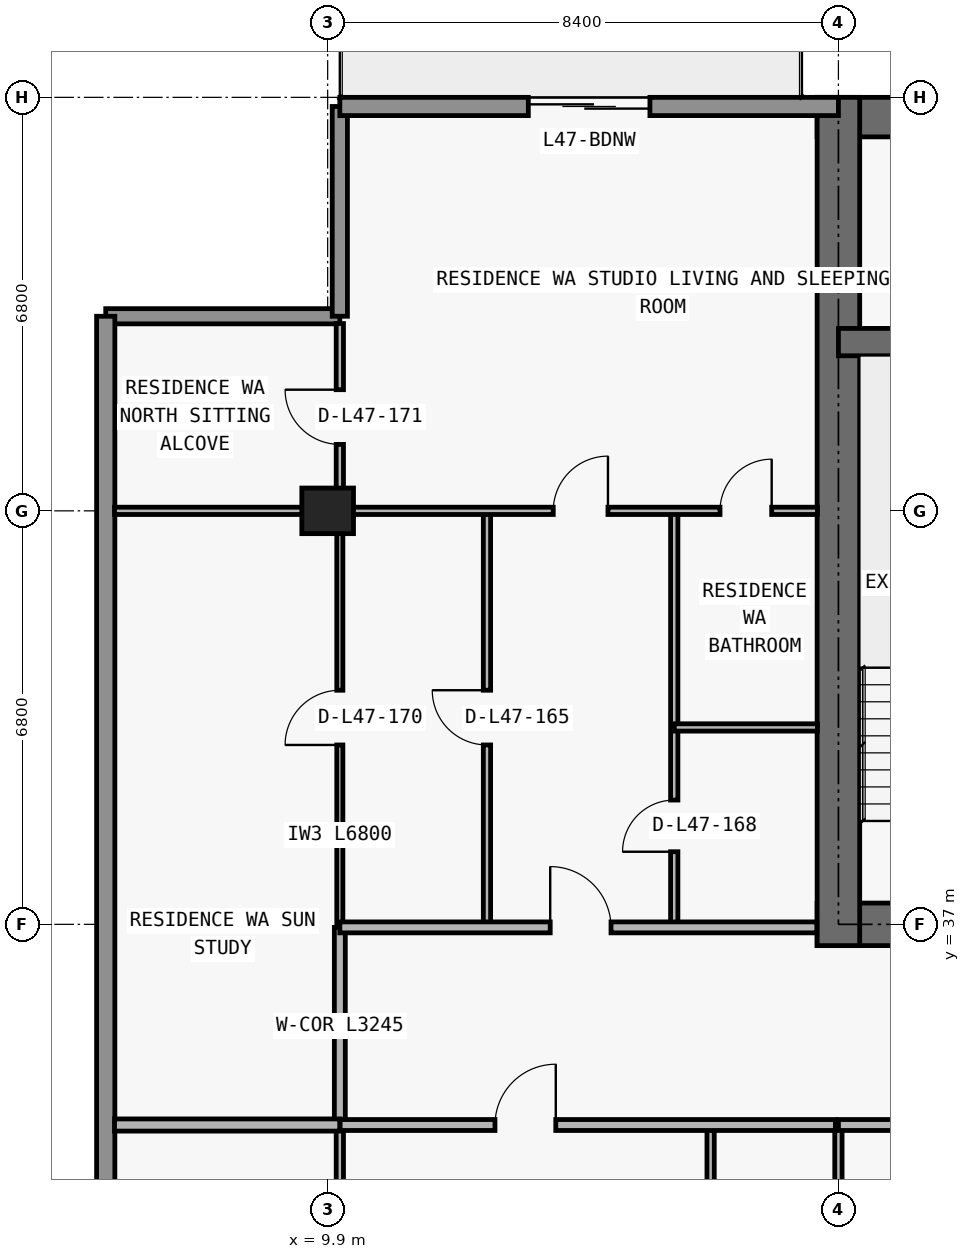
"""IFC4 building model, lengths in metres.
Left out: names, types, materials, properties, quantities, classifications, styles, units other than length and angle.
Written with IfcOpenShell. Run it as: python <this file> out.ifc"""

import sys

from ifc_helpers import new_model, si_unit, direction, frame, frame_2d, origin, origin_2d, place, context, subcontext, project, spatial, rectangle, extrude, element, fill, save


model = new_model("IFC4")
c1 = context("Model", 3, precision=1e-05, world=origin(), true_north=direction((0.0, 1.0)))
c2 = subcontext(c1, "Body", "Model", "MODEL_VIEW")
j1 = project(units=[si_unit("LENGTHUNIT", "METRE"), si_unit("PLANEANGLEUNIT", "RADIAN")], contexts=[c1])
p1 = place(None, origin())
s1 = spatial("IfcSite", under=j1, at=p1, CompositionType="ELEMENT")
p2 = place(p1, origin())
s2 = spatial("IfcBuilding", under=s1, at=p2, CompositionType="ELEMENT")
p3 = place(p2, frame((0.0, 0.0, 170.4)))
s3 = spatial("IfcBuildingStorey", under=s2, at=p3, CompositionType="ELEMENT", Elevation=170.4)
p4 = place(p3, frame((9.9, 43.8, 0.0), z_axis=(0.0, 0.0, 1.0), x_axis=(1.0, 0.0, 0.0)))
e1 = element("IfcColumn", 1, at=p4, inside=s3, PredefinedType="COLUMN", context=c2, shape_type="SweptSolid", body=[
    extrude(rectangle(XDim=0.85, YDim=0.75, at=origin_2d()), origin(), (0.0, 0.0, 1.0), 3.05),
])
p5 = place(p3, frame((17.95, 37.0, 0.0), z_axis=(0.0, 0.0, 1.0), x_axis=(1.0, 0.0, 0.0)))
e2 = element("IfcWall", 2, at=p5, inside=s3, PredefinedType="SHEAR", context=c2, shape_type="SweptSolid", body=[
    extrude(rectangle(XDim=41.9, YDim=0.7, at=frame_2d((20.95, 0.0))), origin(), (0.0, 0.0, 1.0), 3.05),
])
p6 = place(p5, frame((14.35, 0.0, 0.0)))
e3 = element("IfcOpeningElement", 3, at=p6, cuts=e2, PredefinedType="OPENING", context=c2, shape_type="SweptSolid", body=[
    extrude(rectangle(XDim=1.1, YDim=2.15, at=frame_2d((0.55, 1.075))), frame((0.0, 0.36, 0.0), z_axis=(0.0, -1.0, 0.0), x_axis=(1.0, 0.0, 0.0)), (0.0, 0.0, 1.0), 0.72),
])
p7 = place(p5, frame((6.2, 0.0, 0.0)))
e4 = element("IfcOpeningElement", 4, at=p7, cuts=e2, PredefinedType="OPENING", context=c2, shape_type="SweptSolid", body=[
    extrude(rectangle(XDim=1.05, YDim=2.15, at=frame_2d((0.525, 1.075))), frame((0.0, 0.36, 0.0), z_axis=(0.0, -1.0, 0.0), x_axis=(1.0, 0.0, 0.0)), (0.0, 0.0, 1.0), 0.72),
])
p8 = place(p5, frame((34.7, 0.0, 0.0)))
e5 = element("IfcOpeningElement", 5, at=p8, cuts=e2, PredefinedType="OPENING", context=c2, shape_type="SweptSolid", body=[
    extrude(rectangle(XDim=1.05, YDim=2.15, at=frame_2d((0.525, 1.075))), frame((0.0, 0.36, 0.0), z_axis=(0.0, -1.0, 0.0), x_axis=(1.0, 0.0, 0.0)), (0.0, 0.0, 1.0), 0.72),
])
p9 = place(p5, frame((10.812, 0.0, 0.0)))
e6 = element("IfcOpeningElement", 6, at=p9, cuts=e2, PredefinedType="OPENING", context=c2, shape_type="SweptSolid", body=[
    extrude(rectangle(XDim=1.05, YDim=2.15, at=frame_2d((0.525, 1.075))), frame((0.0, 0.36, 0.0), z_axis=(0.0, -1.0, 0.0), x_axis=(1.0, 0.0, 0.0)), (0.0, 0.0, 1.0), 0.72),
])
p10 = place(p5, frame((24.05, 0.0, 0.0)))
e7 = element("IfcOpeningElement", 7, at=p10, cuts=e2, PredefinedType="OPENING", context=c2, shape_type="SweptSolid", body=[
    extrude(rectangle(XDim=1.05, YDim=2.15, at=frame_2d((0.525, 1.075))), frame((0.0, 0.36, 0.0), z_axis=(0.0, -1.0, 0.0), x_axis=(1.0, 0.0, 0.0)), (0.0, 0.0, 1.0), 0.72),
])
p11 = place(p3, frame((17.95, 50.275, 0.0), z_axis=(0.0, 0.0, 1.0), x_axis=(1.0, 0.0, 0.0)))
e8 = element("IfcWall", 8, at=p11, inside=s3, PredefinedType="SHEAR", context=c2, shape_type="SweptSolid", body=[
    extrude(rectangle(XDim=41.9, YDim=0.65, at=frame_2d((20.95, 0.0))), origin(), (0.0, 0.0, 1.0), 3.05),
])
p12 = place(p3, frame((18.3, 36.65, 0.0), z_axis=(0.0, 0.0, 1.0), x_axis=(0.0, 1.0, 0.0)))
e9 = element("IfcWall", 9, at=p12, inside=s3, PredefinedType="SHEAR", context=c2, shape_type="SweptSolid", body=[
    extrude(rectangle(XDim=13.95, YDim=0.7, at=frame_2d((6.975, 0.0))), origin(), (0.0, 0.0, 1.0), 3.05),
])
p13 = place(p3, frame((18.3, 46.575, 0.0), z_axis=(0.0, 0.0, 1.0), x_axis=(1.0, 0.0, 0.0)))
e10 = element("IfcWall", 10, at=p13, inside=s3, PredefinedType="SHEAR", context=c2, shape_type="SweptSolid", body=[
    extrude(rectangle(XDim=41.2, YDim=0.45, at=frame_2d((20.6, 0.0))), origin(), (0.0, 0.0, 1.0), 3.05),
])
p14 = place(p13, frame((7.575, 0.0, 0.0)))
e11 = element("IfcOpeningElement", 11, at=p14, cuts=e10, PredefinedType="OPENING", context=c2, shape_type="SweptSolid", body=[
    extrude(rectangle(XDim=1.05, YDim=2.15, at=frame_2d((0.525, 1.075))), frame((0.0, 0.235, 0.0), z_axis=(0.0, -1.0, 0.0), x_axis=(1.0, 0.0, 0.0)), (0.0, 0.0, 1.0), 0.47),
])
p15 = place(p13, frame((32.625, 0.0, 0.0)))
e12 = element("IfcOpeningElement", 12, at=p15, cuts=e10, PredefinedType="OPENING", context=c2, shape_type="SweptSolid", body=[
    extrude(rectangle(XDim=1.05, YDim=2.15, at=frame_2d((0.525, 1.075))), frame((0.0, 0.235, 0.0), z_axis=(0.0, -1.0, 0.0), x_axis=(1.0, 0.0, 0.0)), (0.0, 0.0, 1.0), 0.47),
])
p16 = place(p3, frame((6.25, 47.0, 0.0), z_axis=(0.0, 0.0, 1.0), x_axis=(1.0, 0.0, 0.0)))
e13 = element("IfcWall", 13, at=p16, inside=s3, PredefinedType="ELEMENTEDWALL", context=c2, shape_type="SweptSolid", body=[
    extrude(rectangle(XDim=3.85, YDim=0.25, at=frame_2d((1.925, 0.0))), origin(), (0.0, 0.0, 1.0), 3.05),
])
p17 = place(p3, frame((10.1, 47.0, 0.0), z_axis=(0.0, 0.0, 1.0), x_axis=(0.0, 1.0, 0.0)))
e14 = element("IfcWall", 14, at=p17, inside=s3, PredefinedType="ELEMENTEDWALL", context=c2, shape_type="SweptSolid", body=[
    extrude(rectangle(XDim=3.45, YDim=0.25, at=frame_2d((1.725, 0.0))), origin(), (0.0, 0.0, 1.0), 3.05),
])
p18 = place(p3, frame((6.25, 29.1, 0.0), z_axis=(0.0, 0.0, 1.0), x_axis=(0.0, 1.0, 0.0)))
e15 = element("IfcWall", 15, at=p18, inside=s3, PredefinedType="STANDARD", context=c2, shape_type="SweptSolid", body=[
    extrude(rectangle(XDim=17.9, YDim=0.3, at=frame_2d((8.95, 0.0))), origin(), (0.0, 0.0, 1.0), 3.05),
])
p19 = place(p3, frame((10.1, 50.45, 0.0), z_axis=(0.0, 0.0, 1.0), x_axis=(1.0, 0.0, 0.0)))
e16 = element("IfcWall", 16, at=p19, inside=s3, PredefinedType="STANDARD", context=c2, shape_type="SweptSolid", body=[
    extrude(rectangle(XDim=8.2, YDim=0.3, at=frame_2d((4.1, 0.0))), origin(), (0.0, 0.0, 1.0), 3.05),
])
p20 = place(p19, frame((3.1, 0.0, 0.0)))
e17 = element("IfcOpeningElement", 17, at=p20, cuts=e16, PredefinedType="OPENING", context=c2, shape_type="SweptSolid", body=[
    extrude(rectangle(XDim=2.0, YDim=2.3, at=frame_2d((1.0, 1.15))), frame((0.0, 0.16, 0.0), z_axis=(0.0, -1.0, 0.0), x_axis=(1.0, 0.0, 0.0)), (0.0, 0.0, 1.0), 0.32),
])
p21 = place(p3, frame((10.1, 29.44, 0.0), z_axis=(0.0, 0.0, 1.0), x_axis=(0.0, 1.0, 0.0)))
e18 = element("IfcWall", 18, at=p21, inside=s3, PredefinedType="PARTITIONING", context=c2, shape_type="SweptSolid", body=[
    extrude(rectangle(XDim=4.26, YDim=0.12, at=frame_2d((2.13, 0.0))), origin(), (0.0, 0.0, 1.0), 2.263),
])
p22 = place(p3, frame((10.1, 33.705, 0.0), z_axis=(0.0, 0.0, 1.0), x_axis=(0.0, 1.0, 0.0)))
e19 = element("IfcWall", 19, at=p22, inside=s3, PredefinedType="PARTITIONING", context=c2, shape_type="SweptSolid", body=[
    extrude(rectangle(XDim=3.245, YDim=0.18, at=frame_2d((1.623, 0.0))), origin(), (0.0, 0.0, 1.0), 2.263),
])
p23 = place(p3, frame((10.1, 37.0, 0.0), z_axis=(0.0, 0.0, 1.0), x_axis=(0.0, 1.0, 0.0)))
e20 = element("IfcWall", 20, at=p23, inside=s3, PredefinedType="MOVABLE", context=c2, shape_type="SweptSolid", body=[
    extrude(rectangle(XDim=6.8, YDim=0.1, at=frame_2d((3.4, 0.0))), origin(), (0.0, 0.0, 1.0), 2.263),
])
p24 = place(p23, frame((2.95, 0.0, 0.0)))
e21 = element("IfcOpeningElement", 21, at=p24, cuts=e20, PredefinedType="OPENING", context=c2, shape_type="SweptSolid", body=[
    extrude(rectangle(XDim=0.9, YDim=2.15, at=frame_2d((0.45, 1.075))), frame((0.0, 0.06, 0.0), z_axis=(0.0, -1.0, 0.0), x_axis=(1.0, 0.0, 0.0)), (0.0, 0.0, 1.0), 0.12),
])
p25 = place(p3, frame((10.1, 43.805, 0.0), z_axis=(0.0, 0.0, 1.0), x_axis=(0.0, 1.0, 0.0)))
e22 = element("IfcWall", 22, at=p25, inside=s3, PredefinedType="PARTITIONING", context=c2, shape_type="SweptSolid", body=[
    extrude(rectangle(XDim=3.075, YDim=0.12, at=frame_2d((1.538, 0.0))), origin(), (0.0, 0.0, 1.0), 3.05),
])
p26 = place(p25, frame((1.087, 0.0, 0.0)))
e23 = element("IfcOpeningElement", 23, at=p26, cuts=e22, PredefinedType="OPENING", context=c2, shape_type="SweptSolid", body=[
    extrude(rectangle(XDim=0.9, YDim=2.15, at=frame_2d((0.45, 1.075))), frame((0.0, 0.07, 0.0), z_axis=(0.0, -1.0, 0.0), x_axis=(1.0, 0.0, 0.0)), (0.0, 0.0, 1.0), 0.14),
])
p27 = place(p3, frame((12.52, 37.0, 0.0), z_axis=(0.0, 0.0, 1.0), x_axis=(0.0, 1.0, 0.0)))
e24 = element("IfcWall", 24, at=p27, inside=s3, PredefinedType="PARTITIONING", context=c2, shape_type="SweptSolid", body=[
    extrude(rectangle(XDim=6.8, YDim=0.12, at=frame_2d((3.4, 0.0))), origin(), (0.0, 0.0, 1.0), 3.05),
])
p28 = place(p27, frame((2.95, 0.0, 0.0)))
e25 = element("IfcOpeningElement", 25, at=p28, cuts=e24, PredefinedType="OPENING", context=c2, shape_type="SweptSolid", body=[
    extrude(rectangle(XDim=0.9, YDim=2.15, at=frame_2d((0.45, 1.075))), frame((0.0, 0.07, 0.0), z_axis=(0.0, -1.0, 0.0), x_axis=(1.0, 0.0, 0.0)), (0.0, 0.0, 1.0), 0.14),
])
p29 = place(p3, frame((15.6, 37.0, 0.0), z_axis=(0.0, 0.0, 1.0), x_axis=(0.0, 1.0, 0.0)))
e26 = element("IfcWall", 26, at=p29, inside=s3, PredefinedType="PARTITIONING", context=c2, shape_type="SweptSolid", body=[
    extrude(rectangle(XDim=6.8, YDim=0.12, at=frame_2d((3.4, 0.0))), origin(), (0.0, 0.0, 1.0), 3.05),
])
p30 = place(p29, frame((1.194, 0.0, 0.0)))
e27 = element("IfcOpeningElement", 27, at=p30, cuts=e26, PredefinedType="OPENING", context=c2, shape_type="SweptSolid", body=[
    extrude(rectangle(XDim=0.85, YDim=2.1, at=frame_2d((0.425, 1.05))), frame((0.0, 0.07, 0.0), z_axis=(0.0, -1.0, 0.0), x_axis=(1.0, 0.0, 0.0)), (0.0, 0.0, 1.0), 0.14),
])
p31 = place(p3, frame((16.198, 29.44, 0.0), z_axis=(0.0, 0.0, 1.0), x_axis=(0.0, 1.0, 0.0)))
e28 = element("IfcWall", 28, at=p31, inside=s3, PredefinedType="PARTITIONING", context=c2, shape_type="SweptSolid", body=[
    extrude(rectangle(XDim=4.26, YDim=0.12, at=frame_2d((2.13, 0.0))), origin(), (0.0, 0.0, 1.0), 3.05),
])
p32 = place(p31, frame((1.705, 0.0, 0.0)))
e29 = element("IfcOpeningElement", 29, at=p32, cuts=e28, PredefinedType="OPENING", context=c2, shape_type="SweptSolid", body=[
    extrude(rectangle(XDim=0.85, YDim=2.1, at=frame_2d((0.425, 1.05))), frame((0.0, 0.07, 0.0), z_axis=(0.0, -1.0, 0.0), x_axis=(1.0, 0.0, 0.0)), (0.0, 0.0, 1.0), 0.14),
])
p33 = place(p3, frame((18.3, 29.44, 0.0), z_axis=(0.0, 0.0, 1.0), x_axis=(0.0, 1.0, 0.0)))
e30 = element("IfcWall", 30, at=p33, inside=s3, PredefinedType="PARTITIONING", context=c2, shape_type="SweptSolid", body=[
    extrude(rectangle(XDim=4.26, YDim=0.12, at=frame_2d((2.13, 0.0))), origin(), (0.0, 0.0, 1.0), 2.263),
])
p34 = place(p3, frame((6.395, 33.7, 0.0), z_axis=(0.0, 0.0, 1.0), x_axis=(1.0, 0.0, 0.0)))
e31 = element("IfcWall", 31, at=p34, inside=s3, PredefinedType="PARTITIONING", context=c2, shape_type="SweptSolid", body=[
    extrude(rectangle(XDim=3.705, YDim=0.2, at=frame_2d((1.853, 0.0))), origin(), (0.0, 0.0, 1.0), 3.05),
])
p35 = place(p3, frame((10.105, 33.7, 0.0), z_axis=(0.0, 0.0, 1.0), x_axis=(1.0, 0.0, 0.0)))
e32 = element("IfcWall", 32, at=p35, inside=s3, PredefinedType="PARTITIONING", context=c2, shape_type="SweptSolid", body=[
    extrude(rectangle(XDim=8.145, YDim=0.18, at=frame_2d((4.073, 0.0))), origin(), (0.0, 0.0, 1.0), 3.05),
])
p36 = place(p35, frame((2.546, 0.0, 0.0)))
e33 = element("IfcOpeningElement", 33, at=p36, cuts=e32, PredefinedType="OPENING", context=c2, shape_type="SweptSolid", body=[
    extrude(rectangle(XDim=1.0, YDim=2.2, at=frame_2d((0.5, 1.1))), frame((0.0, 0.1, 0.0), z_axis=(0.0, -1.0, 0.0), x_axis=(1.0, 0.0, 0.0)), (0.0, 0.0, 1.0), 0.2),
])
p37 = place(p3, frame((18.3, 33.7, 0.0), z_axis=(0.0, 0.0, 1.0), x_axis=(1.0, 0.0, 0.0)))
e34 = element("IfcWall", 34, at=p37, inside=s3, PredefinedType="PARTITIONING", context=c2, shape_type="SweptSolid", body=[
    extrude(rectangle(XDim=8.35, YDim=0.18, at=frame_2d((4.175, 0.0))), origin(), (0.0, 0.0, 1.0), 3.05),
])
p38 = place(p3, frame((10.1, 36.95, 0.0), z_axis=(0.0, 0.0, 1.0), x_axis=(1.0, 0.0, 0.0)))
e35 = element("IfcWall", 35, at=p38, inside=s3, PredefinedType="PARTITIONING", context=c2, shape_type="SweptSolid", body=[
    extrude(rectangle(XDim=7.845, YDim=0.18, at=frame_2d((3.922, 0.0))), origin(), (0.0, 0.0, 1.0), 3.05),
])
p39 = place(p38, frame((3.46, 0.0, 0.0)))
e36 = element("IfcOpeningElement", 36, at=p39, cuts=e35, PredefinedType="OPENING", context=c2, shape_type="SweptSolid", body=[
    extrude(rectangle(XDim=1.0, YDim=2.2, at=frame_2d((0.5, 1.1))), frame((0.0, 0.1, 0.0), z_axis=(0.0, -1.0, 0.0), x_axis=(1.0, 0.0, 0.0)), (0.0, 0.0, 1.0), 0.2),
])
p40 = place(p3, frame((15.6, 40.238, 0.0), z_axis=(0.0, 0.0, 1.0), x_axis=(1.0, 0.0, 0.0)))
e37 = element("IfcWall", 37, at=p40, inside=s3, PredefinedType="PARTITIONING", context=c2, shape_type="SweptSolid", body=[
    extrude(rectangle(XDim=2.355, YDim=0.12, at=frame_2d((1.177, 0.0))), origin(), (0.0, 0.0, 1.0), 3.05),
])
p41 = place(p3, frame((6.395, 43.8, 0.0), z_axis=(0.0, 0.0, 1.0), x_axis=(1.0, 0.0, 0.0)))
e38 = element("IfcWall", 38, at=p41, inside=s3, PredefinedType="PARTITIONING", context=c2, shape_type="SweptSolid", body=[
    extrude(rectangle(XDim=11.56, YDim=0.12, at=frame_2d((5.78, 0.0))), origin(), (0.0, 0.0, 1.0), 2.418),
])
p42 = place(p41, frame((7.215, 0.0, 0.0)))
e39 = element("IfcOpeningElement", 39, at=p42, cuts=e38, PredefinedType="OPENING", context=c2, shape_type="SweptSolid", body=[
    extrude(rectangle(XDim=0.9, YDim=2.15, at=frame_2d((0.45, 1.075))), frame((0.0, 0.07, 0.0), z_axis=(0.0, -1.0, 0.0), x_axis=(1.0, 0.0, 0.0)), (0.0, 0.0, 1.0), 0.14),
])
p43 = place(p41, frame((9.958, 0.0, 0.0)))
e40 = element("IfcOpeningElement", 40, at=p43, cuts=e38, PredefinedType="OPENING", context=c2, shape_type="SweptSolid", body=[
    extrude(rectangle(XDim=0.85, YDim=2.1, at=frame_2d((0.425, 1.05))), frame((0.0, 0.07, 0.0), z_axis=(0.0, -1.0, 0.0), x_axis=(1.0, 0.0, 0.0)), (0.0, 0.0, 1.0), 0.14),
])
p44 = place(p20, origin())
e41 = element("IfcDoor", 41, at=p44, inside=s3, OperationType="DOUBLE_DOOR_SLIDING", PredefinedType="DOOR", context=c2, shape_type="SweptSolid", body=[
    extrude(rectangle(XDim=2.0, YDim=2.3, at=frame_2d((1.0, 1.15))), frame((0.0, 0.025, 0.0), z_axis=(0.0, -1.0, 0.0), x_axis=(1.0, 0.0, 0.0)), (0.0, 0.0, 1.0), 0.05),
])
fill(e17, e41)
p45 = place(p36, origin())
e42 = element("IfcDoor", 42, at=p45, inside=s3, OperationType="SINGLE_SWING_RIGHT", PredefinedType="DOOR", context=c2, shape_type="SweptSolid", body=[
    extrude(rectangle(XDim=1.0, YDim=2.2, at=frame_2d((0.5, 1.1))), frame((0.0, 0.025, 0.0), z_axis=(0.0, -1.0, 0.0), x_axis=(1.0, 0.0, 0.0)), (0.0, 0.0, 1.0), 0.05),
])
fill(e33, e42)
p46 = place(p28, origin())
e43 = element("IfcDoor", 43, at=p46, inside=s3, OperationType="SINGLE_SWING_RIGHT", PredefinedType="DOOR", context=c2, shape_type="SweptSolid", body=[
    extrude(rectangle(XDim=0.9, YDim=2.15, at=frame_2d((0.45, 1.075))), frame((0.0, 0.025, 0.0), z_axis=(0.0, -1.0, 0.0), x_axis=(1.0, 0.0, 0.0)), (0.0, 0.0, 1.0), 0.05),
])
fill(e25, e43)
p47 = place(p39, origin())
e44 = element("IfcDoor", 44, at=p47, inside=s3, OperationType="SINGLE_SWING_LEFT", PredefinedType="DOOR", context=c2, shape_type="SweptSolid", body=[
    extrude(rectangle(XDim=1.0, YDim=2.2, at=frame_2d((0.5, 1.1))), frame((0.0, 0.025, 0.0), z_axis=(0.0, -1.0, 0.0), x_axis=(1.0, 0.0, 0.0)), (0.0, 0.0, 1.0), 0.05),
])
fill(e36, e44)
p48 = place(p42, origin())
e45 = element("IfcDoor", 45, at=p48, inside=s3, OperationType="SINGLE_SWING_RIGHT", PredefinedType="DOOR", context=c2, shape_type="SweptSolid", body=[
    extrude(rectangle(XDim=0.9, YDim=2.15, at=frame_2d((0.45, 1.075))), frame((0.0, 0.025, 0.0), z_axis=(0.0, -1.0, 0.0), x_axis=(1.0, 0.0, 0.0)), (0.0, 0.0, 1.0), 0.05),
])
fill(e39, e45)
p49 = place(p30, origin())
e46 = element("IfcDoor", 46, at=p49, inside=s3, OperationType="SINGLE_SWING_LEFT", PredefinedType="DOOR", context=c2, shape_type="SweptSolid", body=[
    extrude(rectangle(XDim=0.85, YDim=2.1, at=frame_2d((0.425, 1.05))), frame((0.0, 0.025, 0.0), z_axis=(0.0, -1.0, 0.0), x_axis=(1.0, 0.0, 0.0)), (0.0, 0.0, 1.0), 0.05),
])
fill(e27, e46)
p50 = place(p43, origin())
e47 = element("IfcDoor", 47, at=p50, inside=s3, OperationType="SINGLE_SWING_RIGHT", PredefinedType="DOOR", context=c2, shape_type="SweptSolid", body=[
    extrude(rectangle(XDim=0.85, YDim=2.1, at=frame_2d((0.425, 1.05))), frame((0.0, 0.025, 0.0), z_axis=(0.0, -1.0, 0.0), x_axis=(1.0, 0.0, 0.0)), (0.0, 0.0, 1.0), 0.05),
])
fill(e40, e47)
p51 = place(p24, origin())
e48 = element("IfcDoor", 48, at=p51, inside=s3, OperationType="SINGLE_SWING_LEFT", PredefinedType="DOOR", context=c2, shape_type="SweptSolid", body=[
    extrude(rectangle(XDim=0.9, YDim=2.15, at=frame_2d((0.45, 1.075))), frame((0.0, 0.025, 0.0), z_axis=(0.0, -1.0, 0.0), x_axis=(1.0, 0.0, 0.0)), (0.0, 0.0, 1.0), 0.05),
])
fill(e21, e48)
p52 = place(p26, origin())
e49 = element("IfcDoor", 49, at=p52, inside=s3, OperationType="SINGLE_SWING_RIGHT", PredefinedType="DOOR", context=c2, shape_type="SweptSolid", body=[
    extrude(rectangle(XDim=0.9, YDim=2.15, at=frame_2d((0.45, 1.075))), frame((0.0, 0.025, 0.0), z_axis=(0.0, -1.0, 0.0), x_axis=(1.0, 0.0, 0.0)), (0.0, 0.0, 1.0), 0.05),
])
fill(e23, e49)
save(model, sys.argv[1])
